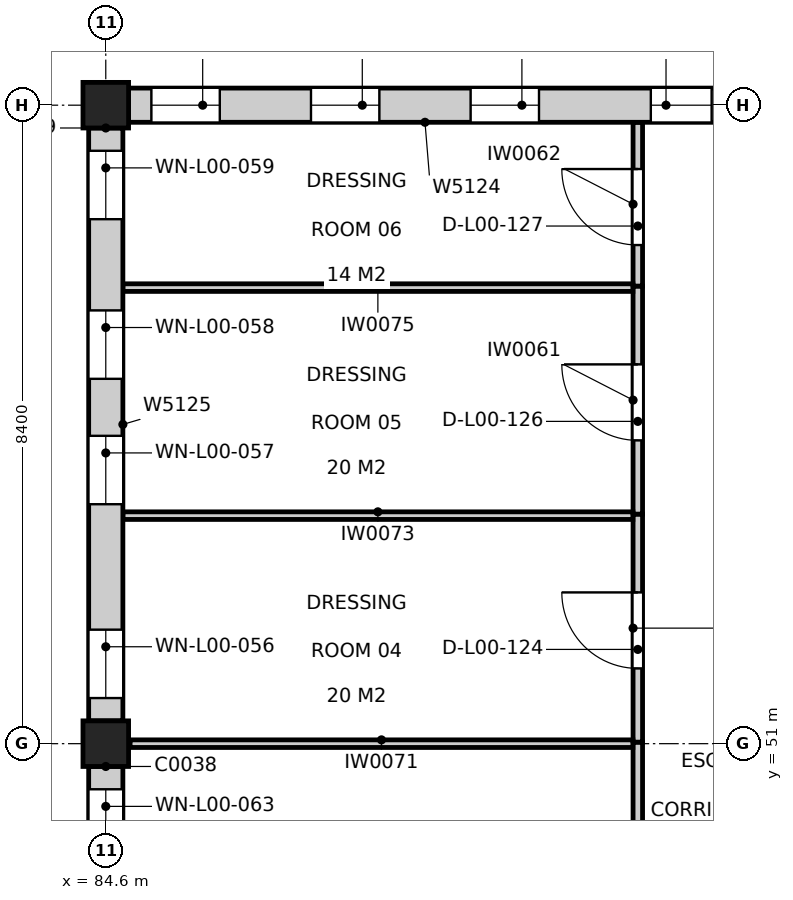
"""IFC4 building model, lengths in metres.
Left out: names, types, materials, properties, quantities, classifications, styles, units other than length and angle.
Written with IfcOpenShell. Run it as: python <this file> out.ifc"""

import sys

from ifc_helpers import new_model, si_unit, direction, frame, frame_2d, origin, origin_2d, place, context, subcontext, project, spatial, rectangle, extrude, element, fill, save


model = new_model("IFC4")
c1 = context("Model", 3, precision=1e-05, world=origin(), true_north=direction((0.0, 1.0)))
c2 = subcontext(c1, "Body", "Model", "MODEL_VIEW")
j1 = project(units=[si_unit("LENGTHUNIT", "METRE"), si_unit("PLANEANGLEUNIT", "RADIAN")], contexts=[c1])
p1 = place(None, origin())
s1 = spatial("IfcSite", under=j1, at=p1, CompositionType="ELEMENT")
p2 = place(p1, origin())
s2 = spatial("IfcBuilding", under=s1, at=p2, CompositionType="ELEMENT")
p3 = place(p2, origin())
s3 = spatial("IfcBuildingStorey", under=s2, at=p3, CompositionType="ELEMENT", Elevation=0.0)
for number, where, z_axis, x_axis in (
    (1, (84.6, 51.0, 0.0), (0.0, 0.0, 1.0), (1.0, 0.0, 0.0)),
    (2, (84.6, 59.4, 0.0), (0.0, 0.0, 1.0), (1.0, 0.0, 0.0)),
):
    element("IfcColumn", number, at=place(p3, frame(where, z_axis=z_axis, x_axis=x_axis)), inside=s3, PredefinedType="COLUMN", context=c2, shape_type="SweptSolid", body=[
        extrude(rectangle(XDim=0.6, YDim=0.6, at=origin_2d()), origin(), (0.0, 0.0, 1.0), 4.8),
    ])
p4 = place(p3, frame((91.6, 42.718, 0.0), z_axis=(0.0, 0.0, 1.0), x_axis=(0.0, 1.0, 0.0)))
e3 = element("IfcWall", 3, at=p4, inside=s3, PredefinedType="PARTITIONING", context=c2, shape_type="SweptSolid", body=[
    extrude(rectangle(XDim=8.302, YDim=0.125, at=frame_2d((4.151, 0.0))), origin(), (0.0, 0.0, 1.0), 3.84),
])
p5 = place(p4, frame((0.298, 0.0, 0.0)))
e4 = element("IfcOpeningElement", 4, at=p5, cuts=e3, PredefinedType="OPENING", context=c2, shape_type="SweptSolid", body=[
    extrude(rectangle(XDim=0.9, YDim=2.1, at=frame_2d((0.45, 1.05))), frame((0.0, 0.073, 0.0), z_axis=(0.0, -1.0, 0.0), x_axis=(1.0, 0.0, 0.0)), (0.0, 0.0, 1.0), 0.145),
])
p6 = place(p3, frame((91.6, 51.02, 0.0), z_axis=(0.0, 0.0, 1.0), x_axis=(0.0, 1.0, 0.0)))
e5 = element("IfcWall", 5, at=p6, inside=s3, PredefinedType="PARTITIONING", context=c2, shape_type="SweptSolid", body=[
    extrude(rectangle(XDim=3.0, YDim=0.125, at=frame_2d((1.5, 0.0))), origin(), (0.0, 0.0, 1.0), 3.84),
])
p7 = place(p6, frame((0.97, 0.0, 0.0)))
e6 = element("IfcOpeningElement", 6, at=p7, cuts=e5, PredefinedType="OPENING", context=c2, shape_type="SweptSolid", body=[
    extrude(rectangle(XDim=1.0, YDim=2.1, at=frame_2d((0.5, 1.05))), frame((0.0, 0.073, 0.0), z_axis=(0.0, -1.0, 0.0), x_axis=(1.0, 0.0, 0.0)), (0.0, 0.0, 1.0), 0.145),
])
p8 = place(p3, frame((91.6, 54.02, 0.0), z_axis=(0.0, 0.0, 1.0), x_axis=(0.0, 1.0, 0.0)))
e7 = element("IfcWall", 7, at=p8, inside=s3, PredefinedType="PARTITIONING", context=c2, shape_type="SweptSolid", body=[
    extrude(rectangle(XDim=3.0, YDim=0.125, at=frame_2d((1.5, 0.0))), origin(), (0.0, 0.0, 1.0), 3.94),
])
p9 = place(p8, frame((0.97, 0.0, 0.0)))
e8 = element("IfcOpeningElement", 8, at=p9, cuts=e7, PredefinedType="OPENING", context=c2, shape_type="SweptSolid", body=[
    extrude(rectangle(XDim=1.0, YDim=2.1, at=frame_2d((0.5, 1.05))), frame((0.0, 0.073, 0.0), z_axis=(0.0, -1.0, 0.0), x_axis=(1.0, 0.0, 0.0)), (0.0, 0.0, 1.0), 0.145),
])
p10 = place(p3, frame((91.6, 57.02, 0.0), z_axis=(0.0, 0.0, 1.0), x_axis=(0.0, 1.0, 0.0)))
e9 = element("IfcWall", 9, at=p10, inside=s3, PredefinedType="PARTITIONING", context=c2, shape_type="SweptSolid", body=[
    extrude(rectangle(XDim=2.155, YDim=0.125, at=frame_2d((1.077, 0.0))), origin(), (0.0, 0.0, 1.0), 4.64),
])
p11 = place(p10, frame((0.54, 0.0, 0.0)))
e10 = element("IfcOpeningElement", 10, at=p11, cuts=e9, PredefinedType="OPENING", context=c2, shape_type="SweptSolid", body=[
    extrude(rectangle(XDim=1.0, YDim=2.1, at=frame_2d((0.5, 1.05))), frame((0.0, 0.073, 0.0), z_axis=(0.0, -1.0, 0.0), x_axis=(1.0, 0.0, 0.0)), (0.0, 0.0, 1.0), 0.145),
])
p12 = place(p3, frame((84.92, 51.0, 0.0), z_axis=(0.0, 0.0, 1.0), x_axis=(1.0, 0.0, 0.0)))
e11 = element("IfcWall", 11, at=p12, inside=s3, PredefinedType="PARTITIONING", context=c2, shape_type="SweptSolid", body=[
    extrude(rectangle(XDim=6.615, YDim=0.1, at=frame_2d((3.307, 0.0))), origin(), (0.0, 0.0, 1.0), 3.84),
])
p13 = place(p3, frame((84.825, 54.0, 0.0), z_axis=(0.0, 0.0, 1.0), x_axis=(1.0, 0.0, 0.0)))
e12 = element("IfcWall", 12, at=p13, inside=s3, PredefinedType="PARTITIONING", context=c2, shape_type="SweptSolid", body=[
    extrude(rectangle(XDim=6.71, YDim=0.1, at=frame_2d((3.355, 0.0))), origin(), (0.0, 0.0, 1.0), 3.94),
])
p14 = place(p3, frame((84.825, 57.0, 0.0), z_axis=(0.0, 0.0, 1.0), x_axis=(1.0, 0.0, 0.0)))
e13 = element("IfcWall", 13, at=p14, inside=s3, PredefinedType="PARTITIONING", context=c2, shape_type="SweptSolid", body=[
    extrude(rectangle(XDim=6.71, YDim=0.1, at=frame_2d((3.355, 0.0))), origin(), (0.0, 0.0, 1.0), 4.64),
])
p15 = place(p3, frame((92.7, 59.4, 0.0), z_axis=(0.0, 0.0, 1.0), x_axis=(-1.0, 0.0, 0.0)))
e14 = element("IfcWall", 14, at=p15, inside=s3, PredefinedType="SOLIDWALL", context=c2, shape_type="SweptSolid", body=[
    extrude(rectangle(XDim=7.8, YDim=0.45, at=frame_2d((3.9, 0.0))), origin(), (0.0, 0.0, 1.0), 3.84),
])
p16 = place(p15, frame((6.6, 0.0, 1.8)))
e15 = element("IfcOpeningElement", 15, at=p16, cuts=e14, PredefinedType="OPENING", context=c2, shape_type="SweptSolid", body=[
    extrude(rectangle(XDim=0.9, YDim=0.6, at=frame_2d((0.45, 0.3))), frame((0.0, 0.235, 0.0), z_axis=(0.0, -1.0, 0.0), x_axis=(1.0, 0.0, 0.0)), (0.0, 0.0, 1.0), 0.47),
])
p17 = place(p15, frame((4.5, 0.0, 1.8)))
e16 = element("IfcOpeningElement", 16, at=p17, cuts=e14, PredefinedType="OPENING", context=c2, shape_type="SweptSolid", body=[
    extrude(rectangle(XDim=0.9, YDim=0.6, at=frame_2d((0.45, 0.3))), frame((0.0, 0.235, 0.0), z_axis=(0.0, -1.0, 0.0), x_axis=(1.0, 0.0, 0.0)), (0.0, 0.0, 1.0), 0.47),
])
p18 = place(p15, frame((2.4, 0.0, 1.8)))
e17 = element("IfcOpeningElement", 17, at=p18, cuts=e14, PredefinedType="OPENING", context=c2, shape_type="SweptSolid", body=[
    extrude(rectangle(XDim=0.9, YDim=0.6, at=frame_2d((0.45, 0.3))), frame((0.0, 0.235, 0.0), z_axis=(0.0, -1.0, 0.0), x_axis=(1.0, 0.0, 0.0)), (0.0, 0.0, 1.0), 0.47),
])
p19 = place(p15, frame((0.129, 0.0, 0.9)))
e18 = element("IfcOpeningElement", 18, at=p19, cuts=e14, PredefinedType="OPENING", context=c2, shape_type="SweptSolid", body=[
    extrude(rectangle(XDim=0.8, YDim=2.4, at=frame_2d((0.4, 1.2))), frame((0.0, 0.235, 0.0), z_axis=(0.0, -1.0, 0.0), x_axis=(1.0, 0.0, 0.0)), (0.0, 0.0, 1.0), 0.47),
])
p20 = place(p3, frame((84.6, 59.1, 0.0), z_axis=(0.0, 0.0, 1.0), x_axis=(0.0, -1.0, 0.0)))
e19 = element("IfcWall", 19, at=p20, inside=s3, PredefinedType="SOLIDWALL", context=c2, shape_type="SweptSolid", body=[
    extrude(rectangle(XDim=7.8, YDim=0.45, at=frame_2d((3.9, 0.0))), origin(), (0.0, 0.0, 1.0), 3.84),
])
p21 = place(p20, frame((6.6, 0.0, 1.8)))
e20 = element("IfcOpeningElement", 20, at=p21, cuts=e19, PredefinedType="OPENING", context=c2, shape_type="SweptSolid", body=[
    extrude(rectangle(XDim=0.9, YDim=0.6, at=frame_2d((0.45, 0.3))), frame((0.0, 0.235, 0.0), z_axis=(0.0, -1.0, 0.0), x_axis=(1.0, 0.0, 0.0)), (0.0, 0.0, 1.0), 0.47),
])
p22 = place(p20, frame((4.05, 0.0, 1.8)))
e21 = element("IfcOpeningElement", 21, at=p22, cuts=e19, PredefinedType="OPENING", context=c2, shape_type="SweptSolid", body=[
    extrude(rectangle(XDim=0.9, YDim=0.6, at=frame_2d((0.45, 0.3))), frame((0.0, 0.235, 0.0), z_axis=(0.0, -1.0, 0.0), x_axis=(1.0, 0.0, 0.0)), (0.0, 0.0, 1.0), 0.47),
])
p23 = place(p20, frame((2.4, 0.0, 1.8)))
e22 = element("IfcOpeningElement", 22, at=p23, cuts=e19, PredefinedType="OPENING", context=c2, shape_type="SweptSolid", body=[
    extrude(rectangle(XDim=0.9, YDim=0.6, at=frame_2d((0.45, 0.3))), frame((0.0, 0.235, 0.0), z_axis=(0.0, -1.0, 0.0), x_axis=(1.0, 0.0, 0.0)), (0.0, 0.0, 1.0), 0.47),
])
p24 = place(p20, frame((0.3, 0.0, 1.8)))
e23 = element("IfcOpeningElement", 23, at=p24, cuts=e19, PredefinedType="OPENING", context=c2, shape_type="SweptSolid", body=[
    extrude(rectangle(XDim=0.9, YDim=0.6, at=frame_2d((0.45, 0.3))), frame((0.0, 0.235, 0.0), z_axis=(0.0, -1.0, 0.0), x_axis=(1.0, 0.0, 0.0)), (0.0, 0.0, 1.0), 0.47),
])
p25 = place(p3, frame((84.6, 50.7, 0.0), z_axis=(0.0, 0.0, 1.0), x_axis=(0.0, -1.0, 0.0)))
e24 = element("IfcWall", 24, at=p25, inside=s3, PredefinedType="SOLIDWALL", context=c2, shape_type="SweptSolid", body=[
    extrude(rectangle(XDim=7.8, YDim=0.45, at=frame_2d((3.9, 0.0))), origin(), (0.0, 0.0, 1.0), 3.84),
])
p26 = place(p25, frame((6.6, 0.0, 1.8)))
e25 = element("IfcOpeningElement", 25, at=p26, cuts=e24, PredefinedType="OPENING", context=c2, shape_type="SweptSolid", body=[
    extrude(rectangle(XDim=0.9, YDim=0.6, at=frame_2d((0.45, 0.3))), frame((0.0, 0.235, 0.0), z_axis=(0.0, -1.0, 0.0), x_axis=(1.0, 0.0, 0.0)), (0.0, 0.0, 1.0), 0.47),
])
p27 = place(p25, frame((4.5, 0.0, 1.8)))
e26 = element("IfcOpeningElement", 26, at=p27, cuts=e24, PredefinedType="OPENING", context=c2, shape_type="SweptSolid", body=[
    extrude(rectangle(XDim=0.9, YDim=0.6, at=frame_2d((0.45, 0.3))), frame((0.0, 0.235, 0.0), z_axis=(0.0, -1.0, 0.0), x_axis=(1.0, 0.0, 0.0)), (0.0, 0.0, 1.0), 0.47),
])
p28 = place(p25, frame((2.4, 0.0, 1.8)))
e27 = element("IfcOpeningElement", 27, at=p28, cuts=e24, PredefinedType="OPENING", context=c2, shape_type="SweptSolid", body=[
    extrude(rectangle(XDim=0.9, YDim=0.6, at=frame_2d((0.45, 0.3))), frame((0.0, 0.235, 0.0), z_axis=(0.0, -1.0, 0.0), x_axis=(1.0, 0.0, 0.0)), (0.0, 0.0, 1.0), 0.47),
])
p29 = place(p25, frame((0.3, 0.0, 1.8)))
e28 = element("IfcOpeningElement", 28, at=p29, cuts=e24, PredefinedType="OPENING", context=c2, shape_type="SweptSolid", body=[
    extrude(rectangle(XDim=0.9, YDim=0.6, at=frame_2d((0.45, 0.3))), frame((0.0, 0.235, 0.0), z_axis=(0.0, -1.0, 0.0), x_axis=(1.0, 0.0, 0.0)), (0.0, 0.0, 1.0), 0.47),
])
p30 = place(p7, origin())
e29 = element("IfcDoor", 29, at=p30, inside=s3, OperationType="SINGLE_SWING_RIGHT", PredefinedType="DOOR", context=c2, shape_type="SweptSolid", body=[
    extrude(rectangle(XDim=1.0, YDim=2.1, at=frame_2d((0.5, 1.05))), frame((0.0, 0.025, 0.0), z_axis=(0.0, -1.0, 0.0), x_axis=(1.0, 0.0, 0.0)), (0.0, 0.0, 1.0), 0.05),
])
fill(e6, e29)
p31 = place(p9, origin())
e30 = element("IfcDoor", 30, at=p31, inside=s3, OperationType="SINGLE_SWING_RIGHT", PredefinedType="DOOR", context=c2, shape_type="SweptSolid", body=[
    extrude(rectangle(XDim=1.0, YDim=2.1, at=frame_2d((0.5, 1.05))), frame((0.0, 0.025, 0.0), z_axis=(0.0, -1.0, 0.0), x_axis=(1.0, 0.0, 0.0)), (0.0, 0.0, 1.0), 0.05),
])
fill(e8, e30)
p32 = place(p11, origin())
e31 = element("IfcDoor", 31, at=p32, inside=s3, OperationType="SINGLE_SWING_RIGHT", PredefinedType="DOOR", context=c2, shape_type="SweptSolid", body=[
    extrude(rectangle(XDim=1.0, YDim=2.1, at=frame_2d((0.5, 1.05))), frame((0.0, 0.025, 0.0), z_axis=(0.0, -1.0, 0.0), x_axis=(1.0, 0.0, 0.0)), (0.0, 0.0, 1.0), 0.05),
])
fill(e10, e31)
p33 = place(p16, origin())
e32 = element("IfcWindow", 32, at=p33, inside=s3, PartitioningType="SINGLE_PANEL", PredefinedType="WINDOW", context=c2, shape_type="SweptSolid", body=[
    extrude(rectangle(XDim=0.9, YDim=0.6, at=frame_2d((0.45, 0.3))), frame((0.0, 0.035, 0.0), z_axis=(0.0, -1.0, 0.0), x_axis=(1.0, 0.0, 0.0)), (0.0, 0.0, 1.0), 0.06),
])
fill(e15, e32)
p34 = place(p17, origin())
e33 = element("IfcWindow", 33, at=p34, inside=s3, PartitioningType="SINGLE_PANEL", PredefinedType="WINDOW", context=c2, shape_type="SweptSolid", body=[
    extrude(rectangle(XDim=0.9, YDim=0.6, at=frame_2d((0.45, 0.3))), frame((0.0, 0.035, 0.0), z_axis=(0.0, -1.0, 0.0), x_axis=(1.0, 0.0, 0.0)), (0.0, 0.0, 1.0), 0.06),
])
fill(e16, e33)
p35 = place(p18, origin())
e34 = element("IfcWindow", 34, at=p35, inside=s3, PartitioningType="SINGLE_PANEL", PredefinedType="WINDOW", context=c2, shape_type="SweptSolid", body=[
    extrude(rectangle(XDim=0.9, YDim=0.6, at=frame_2d((0.45, 0.3))), frame((0.0, 0.035, 0.0), z_axis=(0.0, -1.0, 0.0), x_axis=(1.0, 0.0, 0.0)), (0.0, 0.0, 1.0), 0.06),
])
fill(e17, e34)
p36 = place(p19, origin())
e35 = element("IfcWindow", 35, at=p36, inside=s3, PartitioningType="SINGLE_PANEL", PredefinedType="WINDOW", context=c2, shape_type="SweptSolid", body=[
    extrude(rectangle(XDim=0.8, YDim=2.4, at=frame_2d((0.4, 1.2))), frame((0.0, 0.135, 0.0), z_axis=(0.0, -1.0, 0.0), x_axis=(1.0, 0.0, 0.0)), (0.0, 0.0, 1.0), 0.06),
])
fill(e18, e35)
p37 = place(p21, origin())
e36 = element("IfcWindow", 36, at=p37, inside=s3, PartitioningType="SINGLE_PANEL", PredefinedType="WINDOW", context=c2, shape_type="SweptSolid", body=[
    extrude(rectangle(XDim=0.9, YDim=0.6, at=frame_2d((0.45, 0.3))), frame((0.0, 0.035, 0.0), z_axis=(0.0, -1.0, 0.0), x_axis=(1.0, 0.0, 0.0)), (0.0, 0.0, 1.0), 0.06),
])
fill(e20, e36)
p38 = place(p22, origin())
e37 = element("IfcWindow", 37, at=p38, inside=s3, PartitioningType="SINGLE_PANEL", PredefinedType="WINDOW", context=c2, shape_type="SweptSolid", body=[
    extrude(rectangle(XDim=0.9, YDim=0.6, at=frame_2d((0.45, 0.3))), frame((0.0, 0.035, 0.0), z_axis=(0.0, -1.0, 0.0), x_axis=(1.0, 0.0, 0.0)), (0.0, 0.0, 1.0), 0.06),
])
fill(e21, e37)
p39 = place(p23, origin())
e38 = element("IfcWindow", 38, at=p39, inside=s3, PartitioningType="SINGLE_PANEL", PredefinedType="WINDOW", context=c2, shape_type="SweptSolid", body=[
    extrude(rectangle(XDim=0.9, YDim=0.6, at=frame_2d((0.45, 0.3))), frame((0.0, 0.035, 0.0), z_axis=(0.0, -1.0, 0.0), x_axis=(1.0, 0.0, 0.0)), (0.0, 0.0, 1.0), 0.06),
])
fill(e22, e38)
p40 = place(p24, origin())
e39 = element("IfcWindow", 39, at=p40, inside=s3, PartitioningType="SINGLE_PANEL", PredefinedType="WINDOW", context=c2, shape_type="SweptSolid", body=[
    extrude(rectangle(XDim=0.9, YDim=0.6, at=frame_2d((0.45, 0.3))), frame((0.0, 0.035, 0.0), z_axis=(0.0, -1.0, 0.0), x_axis=(1.0, 0.0, 0.0)), (0.0, 0.0, 1.0), 0.06),
])
fill(e23, e39)
p41 = place(p29, origin())
e40 = element("IfcWindow", 40, at=p41, inside=s3, PartitioningType="SINGLE_PANEL", PredefinedType="WINDOW", context=c2, shape_type="SweptSolid", body=[
    extrude(rectangle(XDim=0.9, YDim=0.6, at=frame_2d((0.45, 0.3))), frame((0.0, 0.035, 0.0), z_axis=(0.0, -1.0, 0.0), x_axis=(1.0, 0.0, 0.0)), (0.0, 0.0, 1.0), 0.06),
])
fill(e28, e40)
save(model, sys.argv[1])
